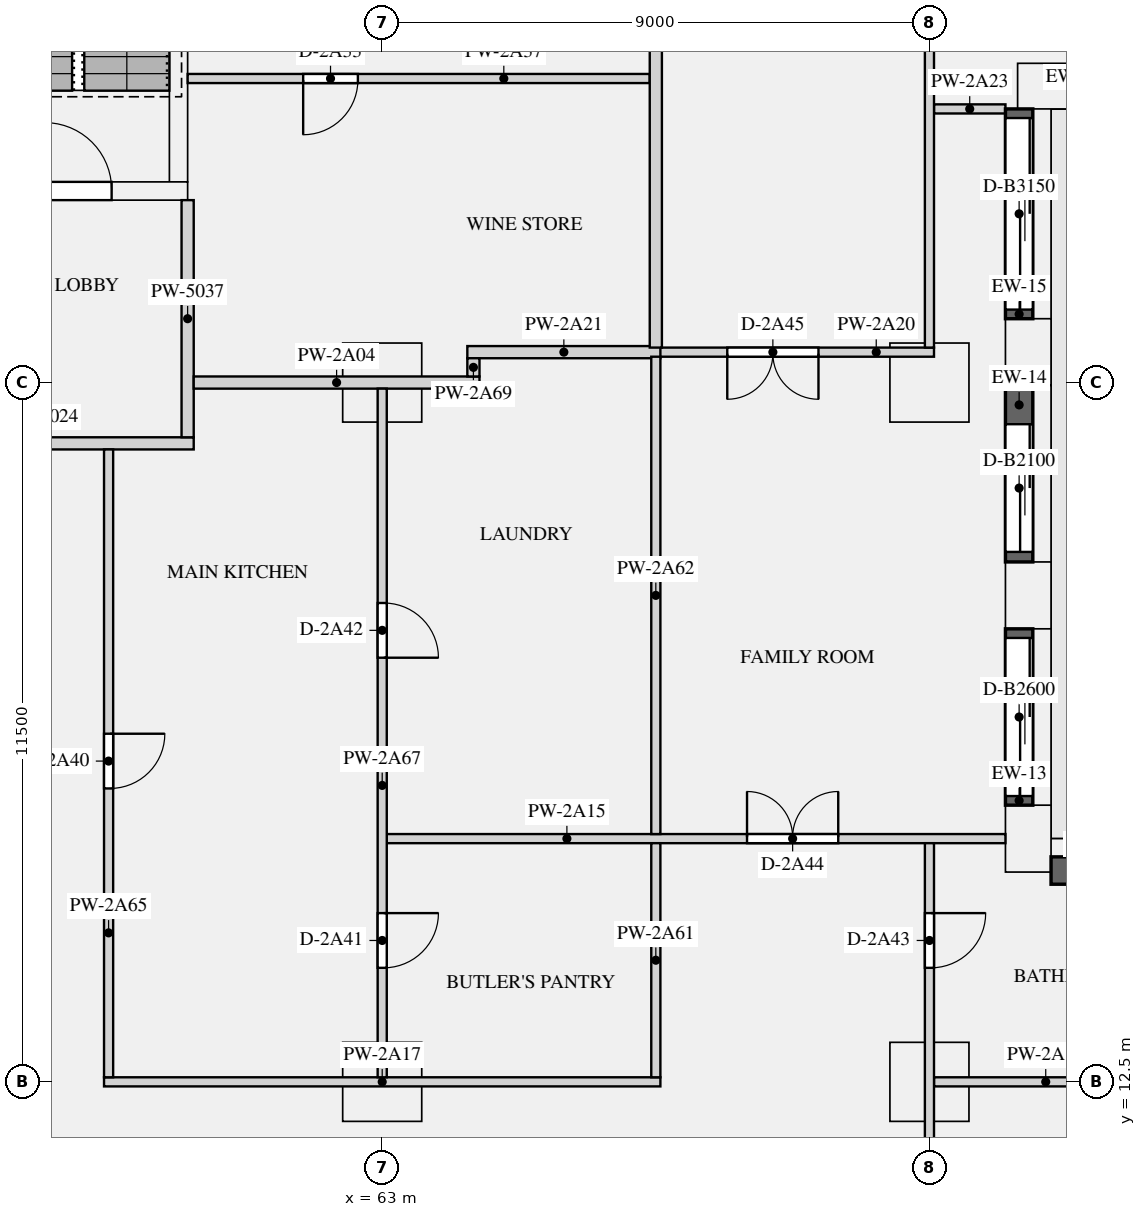
"""IFC4 building model, lengths in metres.
Left out: names, types, materials, properties, quantities, classifications, styles, units other than length and angle.
Written with IfcOpenShell. Run it as: python <this file> out.ifc"""

import sys

from ifc_helpers import new_model, si_unit, direction, frame, frame_2d, origin, origin_2d, place, context, subcontext, project, spatial, rectangle, extrude, element, fill, save


model = new_model("IFC4")
c1 = context("Model", 3, precision=1e-05, world=origin(), true_north=direction((0.0, 1.0)))
c2 = subcontext(c1, "Body", "Model", "MODEL_VIEW")
j1 = project(units=[si_unit("LENGTHUNIT", "METRE"), si_unit("PLANEANGLEUNIT", "RADIAN")], contexts=[c1])
p1 = place(None, origin())
s1 = spatial("IfcSite", under=j1, at=p1, CompositionType="ELEMENT")
p2 = place(p1, origin())
s2 = spatial("IfcBuilding", under=s1, at=p2, CompositionType="ELEMENT")
p3 = place(p2, frame((0.0, 0.0, 83.55)))
s3 = spatial("IfcBuildingStorey", under=s2, at=p3, CompositionType="ELEMENT", Elevation=83.55)
for number, where, z_axis, x_axis in (
    (1, (73.625, 16.5, 0.0), (0.0, 0.0, 1.0), (0.0, 1.0, 0.0)),
    (2, (73.625, 20.5, 0.0), (0.0, 0.0, 1.0), (0.0, 1.0, 0.0)),
    (3, (73.625, 24.5, 0.0), (0.0, 0.0, 1.0), (0.0, 1.0, 0.0)),
    (4, (74.0, 28.875, 0.0), (0.0, 0.0, 1.0), (1.0, 0.0, 0.0)),
):
    element("IfcColumn", number, at=place(p3, frame(where, z_axis=z_axis, x_axis=x_axis)), inside=s3, PredefinedType="USERDEFINED", context=c2, shape_type="SweptSolid", body=[
        extrude(rectangle(XDim=1.1, YDim=0.75, at=origin_2d()), origin(), (0.0, 0.0, 1.0), 3.15),
    ])
for number, where, z_axis, x_axis in (
    (5, (63.0, 24.0, 0.0), (0.0, 0.0, 1.0), (1.0, 0.0, 0.0)),
    (6, (72.0, 24.0, 0.0), (0.0, 0.0, 1.0), (1.0, 0.0, 0.0)),
    (7, (63.0, 12.5, 0.0), (0.0, 0.0, 1.0), (1.0, 0.0, 0.0)),
    (8, (72.0, 12.5, 0.0), (0.0, 0.0, 1.0), (1.0, 0.0, 0.0)),
):
    element("IfcColumn", number, at=place(p3, frame(where, z_axis=z_axis, x_axis=x_axis)), inside=s3, PredefinedType="COLUMN", context=c2, shape_type="SweptSolid", body=[
        extrude(rectangle(XDim=1.3, YDim=1.3, at=origin_2d()), origin(), (0.0, 0.0, 1.0), 3.15),
    ])
p4 = place(p3, frame((56.2, 27.15, 0.0), z_axis=(0.0, 0.0, 1.0), x_axis=(1.0, 0.0, 0.0)))
e9 = element("IfcWall", 9, at=p4, inside=s3, PredefinedType="SHEAR", context=c2, shape_type="SweptSolid", body=[
    extrude(rectangle(XDim=3.6, YDim=0.3, at=frame_2d((1.8, 0.0))), origin(), (0.0, 0.0, 1.0), 3.15),
])
p5 = place(p4, frame((1.25, 0.0, 0.0)))
e10 = element("IfcOpeningElement", 10, at=p5, cuts=e9, PredefinedType="OPENING", context=c2, shape_type="SweptSolid", body=[
    extrude(rectangle(XDim=1.1, YDim=2.1, at=frame_2d((0.55, 1.05))), frame((0.0, 0.16, 0.0), z_axis=(0.0, -1.0, 0.0), x_axis=(1.0, 0.0, 0.0)), (0.0, 0.0, 1.0), 0.32),
])
p6 = place(p3, frame((59.65, 27.3, 0.0), z_axis=(0.0, 0.0, 1.0), x_axis=(0.0, 1.0, 0.0)))
e11 = element("IfcWall", 11, at=p6, inside=s3, PredefinedType="SHEAR", context=c2, shape_type="SweptSolid", body=[
    extrude(rectangle(XDim=7.8, YDim=0.3, at=frame_2d((3.9, 0.0))), origin(), (0.0, 0.0, 1.0), 3.15),
])
p7 = place(p3, frame((75.4, 15.975, 0.9), z_axis=(0.0, 0.0, 1.0), x_axis=(-1.0, 0.0, 0.0)))
e12 = element("IfcWall", 12, at=p7, inside=s3, PredefinedType="SOLIDWALL", context=c2, shape_type="SweptSolid", body=[
    extrude(rectangle(XDim=1.4, YDim=0.45, at=frame_2d((0.7, 0.0))), origin(), (0.0, 0.0, 1.0), 1.93),
])
p8 = place(p3, frame((73.475, 17.05, 0.0), z_axis=(0.0, 0.0, 1.0), x_axis=(0.0, 1.0, 0.0)))
e13 = element("IfcWall", 13, at=p8, inside=s3, PredefinedType="SOLIDWALL", context=c2, shape_type="SweptSolid", body=[
    extrude(rectangle(XDim=2.9, YDim=0.45, at=frame_2d((1.45, 0.0))), origin(), (0.0, 0.0, 1.0), 2.83),
])
p9 = place(p8, frame((0.15, 0.0, 0.0)))
e14 = element("IfcOpeningElement", 14, at=p9, cuts=e13, PredefinedType="OPENING", context=c2, shape_type="SweptSolid", body=[
    extrude(rectangle(XDim=2.6, YDim=2.3, at=frame_2d((1.3, 1.15))), frame((0.0, 0.235, 0.0), z_axis=(0.0, -1.0, 0.0), x_axis=(1.0, 0.0, 0.0)), (0.0, 0.0, 1.0), 0.47),
])
p10 = place(p3, frame((73.475, 21.05, 0.0), z_axis=(0.0, 0.0, 1.0), x_axis=(0.0, 1.0, 0.0)))
e15 = element("IfcWall", 15, at=p10, inside=s3, PredefinedType="SOLIDWALL", context=c2, shape_type="SweptSolid", body=[
    extrude(rectangle(XDim=2.9, YDim=0.45, at=frame_2d((1.45, 0.0))), origin(), (0.0, 0.0, 1.0), 2.83),
])
p11 = place(p10, frame((0.165, 0.0, 0.0)))
e16 = element("IfcOpeningElement", 16, at=p11, cuts=e15, PredefinedType="OPENING", context=c2, shape_type="SweptSolid", body=[
    extrude(rectangle(XDim=2.1, YDim=2.3, at=frame_2d((1.05, 1.15))), frame((0.0, 0.235, 0.0), z_axis=(0.0, -1.0, 0.0), x_axis=(1.0, 0.0, 0.0)), (0.0, 0.0, 1.0), 0.47),
])
p12 = place(p3, frame((73.475, 25.05, 0.0), z_axis=(0.0, 0.0, 1.0), x_axis=(0.0, 1.0, 0.0)))
e17 = element("IfcWall", 17, at=p12, inside=s3, PredefinedType="SOLIDWALL", context=c2, shape_type="SweptSolid", body=[
    extrude(rectangle(XDim=3.45, YDim=0.45, at=frame_2d((1.725, 0.0))), origin(), (0.0, 0.0, 1.0), 2.83),
])
p13 = place(p12, frame((0.15, 0.0, 0.0)))
e18 = element("IfcOpeningElement", 18, at=p13, cuts=e17, PredefinedType="OPENING", context=c2, shape_type="SweptSolid", body=[
    extrude(rectangle(XDim=3.15, YDim=2.3, at=frame_2d((1.575, 1.15))), frame((0.0, 0.235, 0.0), z_axis=(0.0, -1.0, 0.0), x_axis=(1.0, 0.0, 0.0)), (0.0, 0.0, 1.0), 0.47),
])
p14 = place(p3, frame((54.9, 23.0, 0.0), z_axis=(0.0, 0.0, 1.0), x_axis=(1.0, 0.0, 0.0)))
e19 = element("IfcWall", 19, at=p14, inside=s3, PredefinedType="PARTITIONING", context=c2, shape_type="SweptSolid", body=[
    extrude(rectangle(XDim=5.0, YDim=0.2, at=frame_2d((2.5, 0.0))), origin(), (0.0, 0.0, 1.0), 2.83),
])
p15 = place(p3, frame((59.8, 23.1, 0.0), z_axis=(0.0, 0.0, 1.0), x_axis=(0.0, 1.0, 0.0)))
e20 = element("IfcWall", 20, at=p15, inside=s3, PredefinedType="PARTITIONING", context=c2, shape_type="SweptSolid", body=[
    extrude(rectangle(XDim=3.9, YDim=0.2, at=frame_2d((1.95, 0.0))), origin(), (0.0, 0.0, 1.0), 2.83),
])
p16 = place(p3, frame((59.9, 24.0, 0.0), z_axis=(0.0, 0.0, 1.0), x_axis=(1.0, 0.0, 0.0)))
e21 = element("IfcWall", 21, at=p16, inside=s3, PredefinedType="PARTITIONING", context=c2, shape_type="SweptSolid", body=[
    extrude(rectangle(XDim=4.7, YDim=0.2, at=frame_2d((2.35, 0.0))), origin(), (0.0, 0.0, 1.0), 2.83),
])
p17 = place(p3, frame((63.075, 16.5, 0.0), z_axis=(0.0, 0.0, 1.0), x_axis=(1.0, 0.0, 0.0)))
e22 = element("IfcWall", 22, at=p17, inside=s3, PredefinedType="PARTITIONING", context=c2, shape_type="SweptSolid", body=[
    extrude(rectangle(XDim=10.175, YDim=0.15, at=frame_2d((5.087, 0.0))), origin(), (0.0, 0.0, 1.0), 2.83),
])
p18 = place(p17, frame((5.925, 0.0, 0.0)))
e23 = element("IfcOpeningElement", 23, at=p18, cuts=e22, PredefinedType="OPENING", context=c2, shape_type="SweptSolid", body=[
    extrude(rectangle(XDim=1.5, YDim=2.1, at=frame_2d((0.75, 1.05))), frame((0.0, 0.085, 0.0), z_axis=(0.0, -1.0, 0.0), x_axis=(1.0, 0.0, 0.0)), (0.0, 0.0, 1.0), 0.17),
])
p19 = place(p3, frame((58.425, 12.5, 0.0), z_axis=(0.0, 0.0, 1.0), x_axis=(1.0, 0.0, 0.0)))
e24 = element("IfcWall", 24, at=p19, inside=s3, PredefinedType="PARTITIONING", context=c2, shape_type="SweptSolid", body=[
    extrude(rectangle(XDim=9.15, YDim=0.15, at=frame_2d((4.575, 0.0))), origin(), (0.0, 0.0, 1.0), 2.83),
])
p20 = place(p3, frame((72.075, 12.5, 0.0), z_axis=(0.0, 0.0, 1.0), x_axis=(1.0, 0.0, 0.0)))
e25 = element("IfcWall", 25, at=p20, inside=s3, PredefinedType="PARTITIONING", context=c2, shape_type="SweptSolid", body=[
    extrude(rectangle(XDim=3.675, YDim=0.15, at=frame_2d((1.837, 0.0))), origin(), (0.0, 0.0, 1.0), 2.83),
])
p21 = place(p3, frame((67.425, 24.5, 0.0), z_axis=(0.0, 0.0, 1.0), x_axis=(1.0, 0.0, 0.0)))
e26 = element("IfcWall", 26, at=p21, inside=s3, PredefinedType="PARTITIONING", context=c2, shape_type="SweptSolid", body=[
    extrude(rectangle(XDim=4.65, YDim=0.15, at=frame_2d((2.325, 0.0))), origin(), (0.0, 0.0, 1.0), 2.83),
])
p22 = place(p21, frame((1.25, 0.0, 0.0)))
e27 = element("IfcOpeningElement", 27, at=p22, cuts=e26, PredefinedType="OPENING", context=c2, shape_type="SweptSolid", body=[
    extrude(rectangle(XDim=1.5, YDim=2.1, at=frame_2d((0.75, 1.05))), frame((0.0, 0.085, 0.0), z_axis=(0.0, -1.0, 0.0), x_axis=(1.0, 0.0, 0.0)), (0.0, 0.0, 1.0), 0.17),
])
p23 = place(p3, frame((64.4, 24.5, 0.0), z_axis=(0.0, 0.0, 1.0), x_axis=(1.0, 0.0, 0.0)))
e28 = element("IfcWall", 28, at=p23, inside=s3, PredefinedType="PARTITIONING", context=c2, shape_type="SweptSolid", body=[
    extrude(rectangle(XDim=3.175, YDim=0.2, at=frame_2d((1.587, 0.0))), origin(), (0.0, 0.0, 1.0), 2.83),
])
p24 = place(p3, frame((72.075, 28.5, 0.0), z_axis=(0.0, 0.0, 1.0), x_axis=(1.0, 0.0, 0.0)))
e29 = element("IfcWall", 29, at=p24, inside=s3, PredefinedType="PARTITIONING", context=c2, shape_type="SweptSolid", body=[
    extrude(rectangle(XDim=1.175, YDim=0.15, at=frame_2d((0.587, 0.0))), origin(), (0.0, 0.0, 1.0), 2.83),
])
p25 = place(p3, frame((59.8, 29.0, 0.0), z_axis=(0.0, 0.0, 1.0), x_axis=(1.0, 0.0, 0.0)))
e30 = element("IfcWall", 30, at=p25, inside=s3, PredefinedType="PARTITIONING", context=c2, shape_type="SweptSolid", body=[
    extrude(rectangle(XDim=7.6, YDim=0.15, at=frame_2d((3.8, 0.0))), origin(), (0.0, 0.0, 1.0), 2.83),
])
p26 = place(p25, frame((1.9, 0.0, 0.0)))
e31 = element("IfcOpeningElement", 31, at=p26, cuts=e30, PredefinedType="OPENING", context=c2, shape_type="SweptSolid", body=[
    extrude(rectangle(XDim=0.9, YDim=2.1, at=frame_2d((0.45, 1.05))), frame((0.0, 0.085, 0.0), z_axis=(0.0, -1.0, 0.0), x_axis=(1.0, 0.0, 0.0)), (0.0, 0.0, 1.0), 0.17),
])
p27 = place(p3, frame((67.5, 12.575, 0.0), z_axis=(0.0, 0.0, 1.0), x_axis=(0.0, 1.0, 0.0)))
e32 = element("IfcWall", 32, at=p27, inside=s3, PredefinedType="PARTITIONING", context=c2, shape_type="SweptSolid", body=[
    extrude(rectangle(XDim=3.85, YDim=0.15, at=frame_2d((1.925, 0.0))), origin(), (0.0, 0.0, 1.0), 2.83),
])
p28 = place(p3, frame((67.5, 16.575, 0.0), z_axis=(0.0, 0.0, 1.0), x_axis=(0.0, 1.0, 0.0)))
e33 = element("IfcWall", 33, at=p28, inside=s3, PredefinedType="PARTITIONING", context=c2, shape_type="SweptSolid", body=[
    extrude(rectangle(XDim=7.85, YDim=0.15, at=frame_2d((3.925, 0.0))), origin(), (0.0, 0.0, 1.0), 2.83),
])
p29 = place(p3, frame((67.5, 24.575, 0.0), z_axis=(0.0, 0.0, 1.0), x_axis=(0.0, 1.0, 0.0)))
e34 = element("IfcWall", 34, at=p29, inside=s3, PredefinedType="PARTITIONING", context=c2, shape_type="SweptSolid", body=[
    extrude(rectangle(XDim=20.175, YDim=0.2, at=frame_2d((10.087, 0.0))), origin(), (0.0, 0.0, 1.0), 2.83),
])
p30 = place(p3, frame((58.5, 12.575, 0.0), z_axis=(0.0, 0.0, 1.0), x_axis=(0.0, 1.0, 0.0)))
e35 = element("IfcWall", 35, at=p30, inside=s3, PredefinedType="PARTITIONING", context=c2, shape_type="SweptSolid", body=[
    extrude(rectangle(XDim=10.325, YDim=0.15, at=frame_2d((5.163, 0.0))), origin(), (0.0, 0.0, 1.0), 2.83),
])
p31 = place(p30, frame((4.75, 0.0, 0.0)))
e36 = element("IfcOpeningElement", 36, at=p31, cuts=e35, PredefinedType="OPENING", context=c2, shape_type="SweptSolid", body=[
    extrude(rectangle(XDim=0.9, YDim=2.1, at=frame_2d((0.45, 1.05))), frame((0.0, 0.085, 0.0), z_axis=(0.0, -1.0, 0.0), x_axis=(1.0, 0.0, 0.0)), (0.0, 0.0, 1.0), 0.17),
])
p32 = place(p3, frame((63.0, 12.575, 0.0), z_axis=(0.0, 0.0, 1.0), x_axis=(0.0, 1.0, 0.0)))
e37 = element("IfcWall", 37, at=p32, inside=s3, PredefinedType="PARTITIONING", context=c2, shape_type="SweptSolid", body=[
    extrude(rectangle(XDim=11.325, YDim=0.15, at=frame_2d((5.663, 0.0))), origin(), (0.0, 0.0, 1.0), 2.83),
])
p33 = place(p32, frame((1.8, 0.0, 0.0)))
e38 = element("IfcOpeningElement", 38, at=p33, cuts=e37, PredefinedType="OPENING", context=c2, shape_type="SweptSolid", body=[
    extrude(rectangle(XDim=0.9, YDim=2.1, at=frame_2d((0.45, 1.05))), frame((0.0, 0.085, 0.0), z_axis=(0.0, -1.0, 0.0), x_axis=(1.0, 0.0, 0.0)), (0.0, 0.0, 1.0), 0.17),
])
p34 = place(p32, frame((6.9, 0.0, 0.0)))
e39 = element("IfcOpeningElement", 39, at=p34, cuts=e37, PredefinedType="OPENING", context=c2, shape_type="SweptSolid", body=[
    extrude(rectangle(XDim=0.9, YDim=2.1, at=frame_2d((0.45, 1.05))), frame((0.0, 0.085, 0.0), z_axis=(0.0, -1.0, 0.0), x_axis=(1.0, 0.0, 0.0)), (0.0, 0.0, 1.0), 0.17),
])
p35 = place(p3, frame((64.5, 24.1, 0.0), z_axis=(0.0, 0.0, 1.0), x_axis=(0.0, 1.0, 0.0)))
e40 = element("IfcWall", 40, at=p35, inside=s3, PredefinedType="PARTITIONING", context=c2, shape_type="SweptSolid", body=[
    extrude(rectangle(XDim=0.3, YDim=0.2, at=frame_2d((0.15, 0.0))), origin(), (0.0, 0.0, 1.0), 2.83),
])
p36 = place(p3, frame((72.0, 5.25, 0.0), z_axis=(0.0, 0.0, 1.0), x_axis=(0.0, 1.0, 0.0)))
e41 = element("IfcWall", 41, at=p36, inside=s3, PredefinedType="PARTITIONING", context=c2, shape_type="SweptSolid", body=[
    extrude(rectangle(XDim=11.175, YDim=0.15, at=frame_2d((5.587, 0.0))), origin(), (0.0, 0.0, 1.0), 2.83),
])
p37 = place(p36, frame((4.475, 0.0, 0.0)))
e42 = element("IfcOpeningElement", 42, at=p37, cuts=e41, PredefinedType="OPENING", context=c2, shape_type="SweptSolid", body=[
    extrude(rectangle(XDim=0.9, YDim=2.1, at=frame_2d((0.45, 1.05))), frame((0.0, 0.085, 0.0), z_axis=(0.0, -1.0, 0.0), x_axis=(1.0, 0.0, 0.0)), (0.0, 0.0, 1.0), 0.17),
])
p38 = place(p36, frame((9.125, 0.0, 0.0)))
e43 = element("IfcOpeningElement", 43, at=p38, cuts=e41, PredefinedType="OPENING", context=c2, shape_type="SweptSolid", body=[
    extrude(rectangle(XDim=0.9, YDim=2.1, at=frame_2d((0.45, 1.05))), frame((0.0, 0.085, 0.0), z_axis=(0.0, -1.0, 0.0), x_axis=(1.0, 0.0, 0.0)), (0.0, 0.0, 1.0), 0.17),
])
p39 = place(p3, frame((72.0, 24.575, 0.0), z_axis=(0.0, 0.0, 1.0), x_axis=(0.0, 1.0, 0.0)))
e44 = element("IfcWall", 44, at=p39, inside=s3, PredefinedType="PARTITIONING", context=c2, shape_type="SweptSolid", body=[
    extrude(rectangle(XDim=15.675, YDim=0.15, at=frame_2d((7.837, 0.0))), origin(), (0.0, 0.0, 1.0), 2.83),
])
p40 = place(p39, frame((6.65, 0.0, 0.0)))
e45 = element("IfcOpeningElement", 45, at=p40, cuts=e44, PredefinedType="OPENING", context=c2, shape_type="SweptSolid", body=[
    extrude(rectangle(XDim=0.9, YDim=2.1, at=frame_2d((0.45, 1.05))), frame((0.0, 0.085, 0.0), z_axis=(0.0, -1.0, 0.0), x_axis=(1.0, 0.0, 0.0)), (0.0, 0.0, 1.0), 0.17),
])
p41 = place(p9, origin())
e46 = element("IfcDoor", 46, at=p41, inside=s3, OperationType="SLIDING_TO_LEFT", PredefinedType="DOOR", context=c2, shape_type="SweptSolid", body=[
    extrude(rectangle(XDim=2.6, YDim=2.3, at=frame_2d((1.3, 1.15))), frame((0.0, -0.07, 0.0), z_axis=(0.0, -1.0, 0.0), x_axis=(1.0, 0.0, 0.0)), (0.0, 0.0, 1.0), 0.05),
])
fill(e14, e46)
p42 = place(p11, origin())
e47 = element("IfcDoor", 47, at=p42, inside=s3, OperationType="SLIDING_TO_LEFT", PredefinedType="DOOR", context=c2, shape_type="SweptSolid", body=[
    extrude(rectangle(XDim=2.1, YDim=2.3, at=frame_2d((1.05, 1.15))), frame((0.0, -0.07, 0.0), z_axis=(0.0, -1.0, 0.0), x_axis=(1.0, 0.0, 0.0)), (0.0, 0.0, 1.0), 0.05),
])
fill(e16, e47)
p43 = place(p13, origin())
e48 = element("IfcDoor", 48, at=p43, inside=s3, OperationType="SLIDING_TO_LEFT", PredefinedType="DOOR", context=c2, shape_type="SweptSolid", body=[
    extrude(rectangle(XDim=3.15, YDim=2.3, at=frame_2d((1.575, 1.15))), frame((0.0, -0.07, 0.0), z_axis=(0.0, -1.0, 0.0), x_axis=(1.0, 0.0, 0.0)), (0.0, 0.0, 1.0), 0.05),
])
fill(e18, e48)
p44 = place(p5, origin())
e49 = element("IfcDoor", 49, at=p44, inside=s3, OperationType="SINGLE_SWING_LEFT", PredefinedType="DOOR", context=c2, shape_type="SweptSolid", body=[
    extrude(rectangle(XDim=1.1, YDim=2.1, at=frame_2d((0.55, 1.05))), frame((0.0, 0.025, 0.0), z_axis=(0.0, -1.0, 0.0), x_axis=(1.0, 0.0, 0.0)), (0.0, 0.0, 1.0), 0.05),
])
fill(e10, e49)
p45 = place(p26, frame((0.9, 0.0, 0.0), z_axis=(0.0, 0.0, 1.0), x_axis=(-1.0, 0.0, 0.0)))
e50 = element("IfcDoor", 50, at=p45, inside=s3, OperationType="SINGLE_SWING_RIGHT", PredefinedType="DOOR", context=c2, shape_type="SweptSolid", body=[
    extrude(rectangle(XDim=0.9, YDim=2.1, at=frame_2d((0.45, 1.05))), frame((0.0, 0.025, 0.0), z_axis=(0.0, -1.0, 0.0), x_axis=(1.0, 0.0, 0.0)), (0.0, 0.0, 1.0), 0.05),
])
fill(e31, e50)
p46 = place(p31, frame((0.9, 0.0, 0.0), z_axis=(0.0, 0.0, 1.0), x_axis=(-1.0, 0.0, 0.0)))
e51 = element("IfcDoor", 51, at=p46, inside=s3, OperationType="SINGLE_SWING_LEFT", PredefinedType="DOOR", context=c2, shape_type="SweptSolid", body=[
    extrude(rectangle(XDim=0.9, YDim=2.1, at=frame_2d((0.45, 1.05))), frame((0.0, 0.025, 0.0), z_axis=(0.0, -1.0, 0.0), x_axis=(1.0, 0.0, 0.0)), (0.0, 0.0, 1.0), 0.05),
])
fill(e36, e51)
p47 = place(p33, frame((0.9, 0.0, 0.0), z_axis=(0.0, 0.0, 1.0), x_axis=(-1.0, 0.0, 0.0)))
e52 = element("IfcDoor", 52, at=p47, inside=s3, OperationType="SINGLE_SWING_LEFT", PredefinedType="DOOR", context=c2, shape_type="SweptSolid", body=[
    extrude(rectangle(XDim=0.9, YDim=2.1, at=frame_2d((0.45, 1.05))), frame((0.0, 0.025, 0.0), z_axis=(0.0, -1.0, 0.0), x_axis=(1.0, 0.0, 0.0)), (0.0, 0.0, 1.0), 0.05),
])
fill(e38, e52)
p48 = place(p34, frame((0.9, 0.0, 0.0), z_axis=(0.0, 0.0, 1.0), x_axis=(-1.0, 0.0, 0.0)))
e53 = element("IfcDoor", 53, at=p48, inside=s3, OperationType="SINGLE_SWING_RIGHT", PredefinedType="DOOR", context=c2, shape_type="SweptSolid", body=[
    extrude(rectangle(XDim=0.9, YDim=2.1, at=frame_2d((0.45, 1.05))), frame((0.0, 0.025, 0.0), z_axis=(0.0, -1.0, 0.0), x_axis=(1.0, 0.0, 0.0)), (0.0, 0.0, 1.0), 0.05),
])
fill(e39, e53)
p49 = place(p38, frame((0.9, 0.0, 0.0), z_axis=(0.0, 0.0, 1.0), x_axis=(-1.0, 0.0, 0.0)))
e54 = element("IfcDoor", 54, at=p49, inside=s3, OperationType="SINGLE_SWING_LEFT", PredefinedType="DOOR", context=c2, shape_type="SweptSolid", body=[
    extrude(rectangle(XDim=0.9, YDim=2.1, at=frame_2d((0.45, 1.05))), frame((0.0, 0.025, 0.0), z_axis=(0.0, -1.0, 0.0), x_axis=(1.0, 0.0, 0.0)), (0.0, 0.0, 1.0), 0.05),
])
fill(e43, e54)
p50 = place(p18, origin())
e55 = element("IfcDoor", 55, at=p50, inside=s3, OperationType="DOUBLE_DOOR_SINGLE_SWING", PredefinedType="DOOR", context=c2, shape_type="SweptSolid", body=[
    extrude(rectangle(XDim=1.5, YDim=2.1, at=frame_2d((0.75, 1.05))), frame((0.0, 0.025, 0.0), z_axis=(0.0, -1.0, 0.0), x_axis=(1.0, 0.0, 0.0)), (0.0, 0.0, 1.0), 0.05),
])
fill(e23, e55)
p51 = place(p22, frame((1.5, 0.0, 0.0), z_axis=(0.0, 0.0, 1.0), x_axis=(-1.0, 0.0, 0.0)))
e56 = element("IfcDoor", 56, at=p51, inside=s3, OperationType="DOUBLE_DOOR_SINGLE_SWING", PredefinedType="DOOR", context=c2, shape_type="SweptSolid", body=[
    extrude(rectangle(XDim=1.5, YDim=2.1, at=frame_2d((0.75, 1.05))), frame((0.0, 0.025, 0.0), z_axis=(0.0, -1.0, 0.0), x_axis=(1.0, 0.0, 0.0)), (0.0, 0.0, 1.0), 0.05),
])
fill(e27, e56)
save(model, sys.argv[1])
